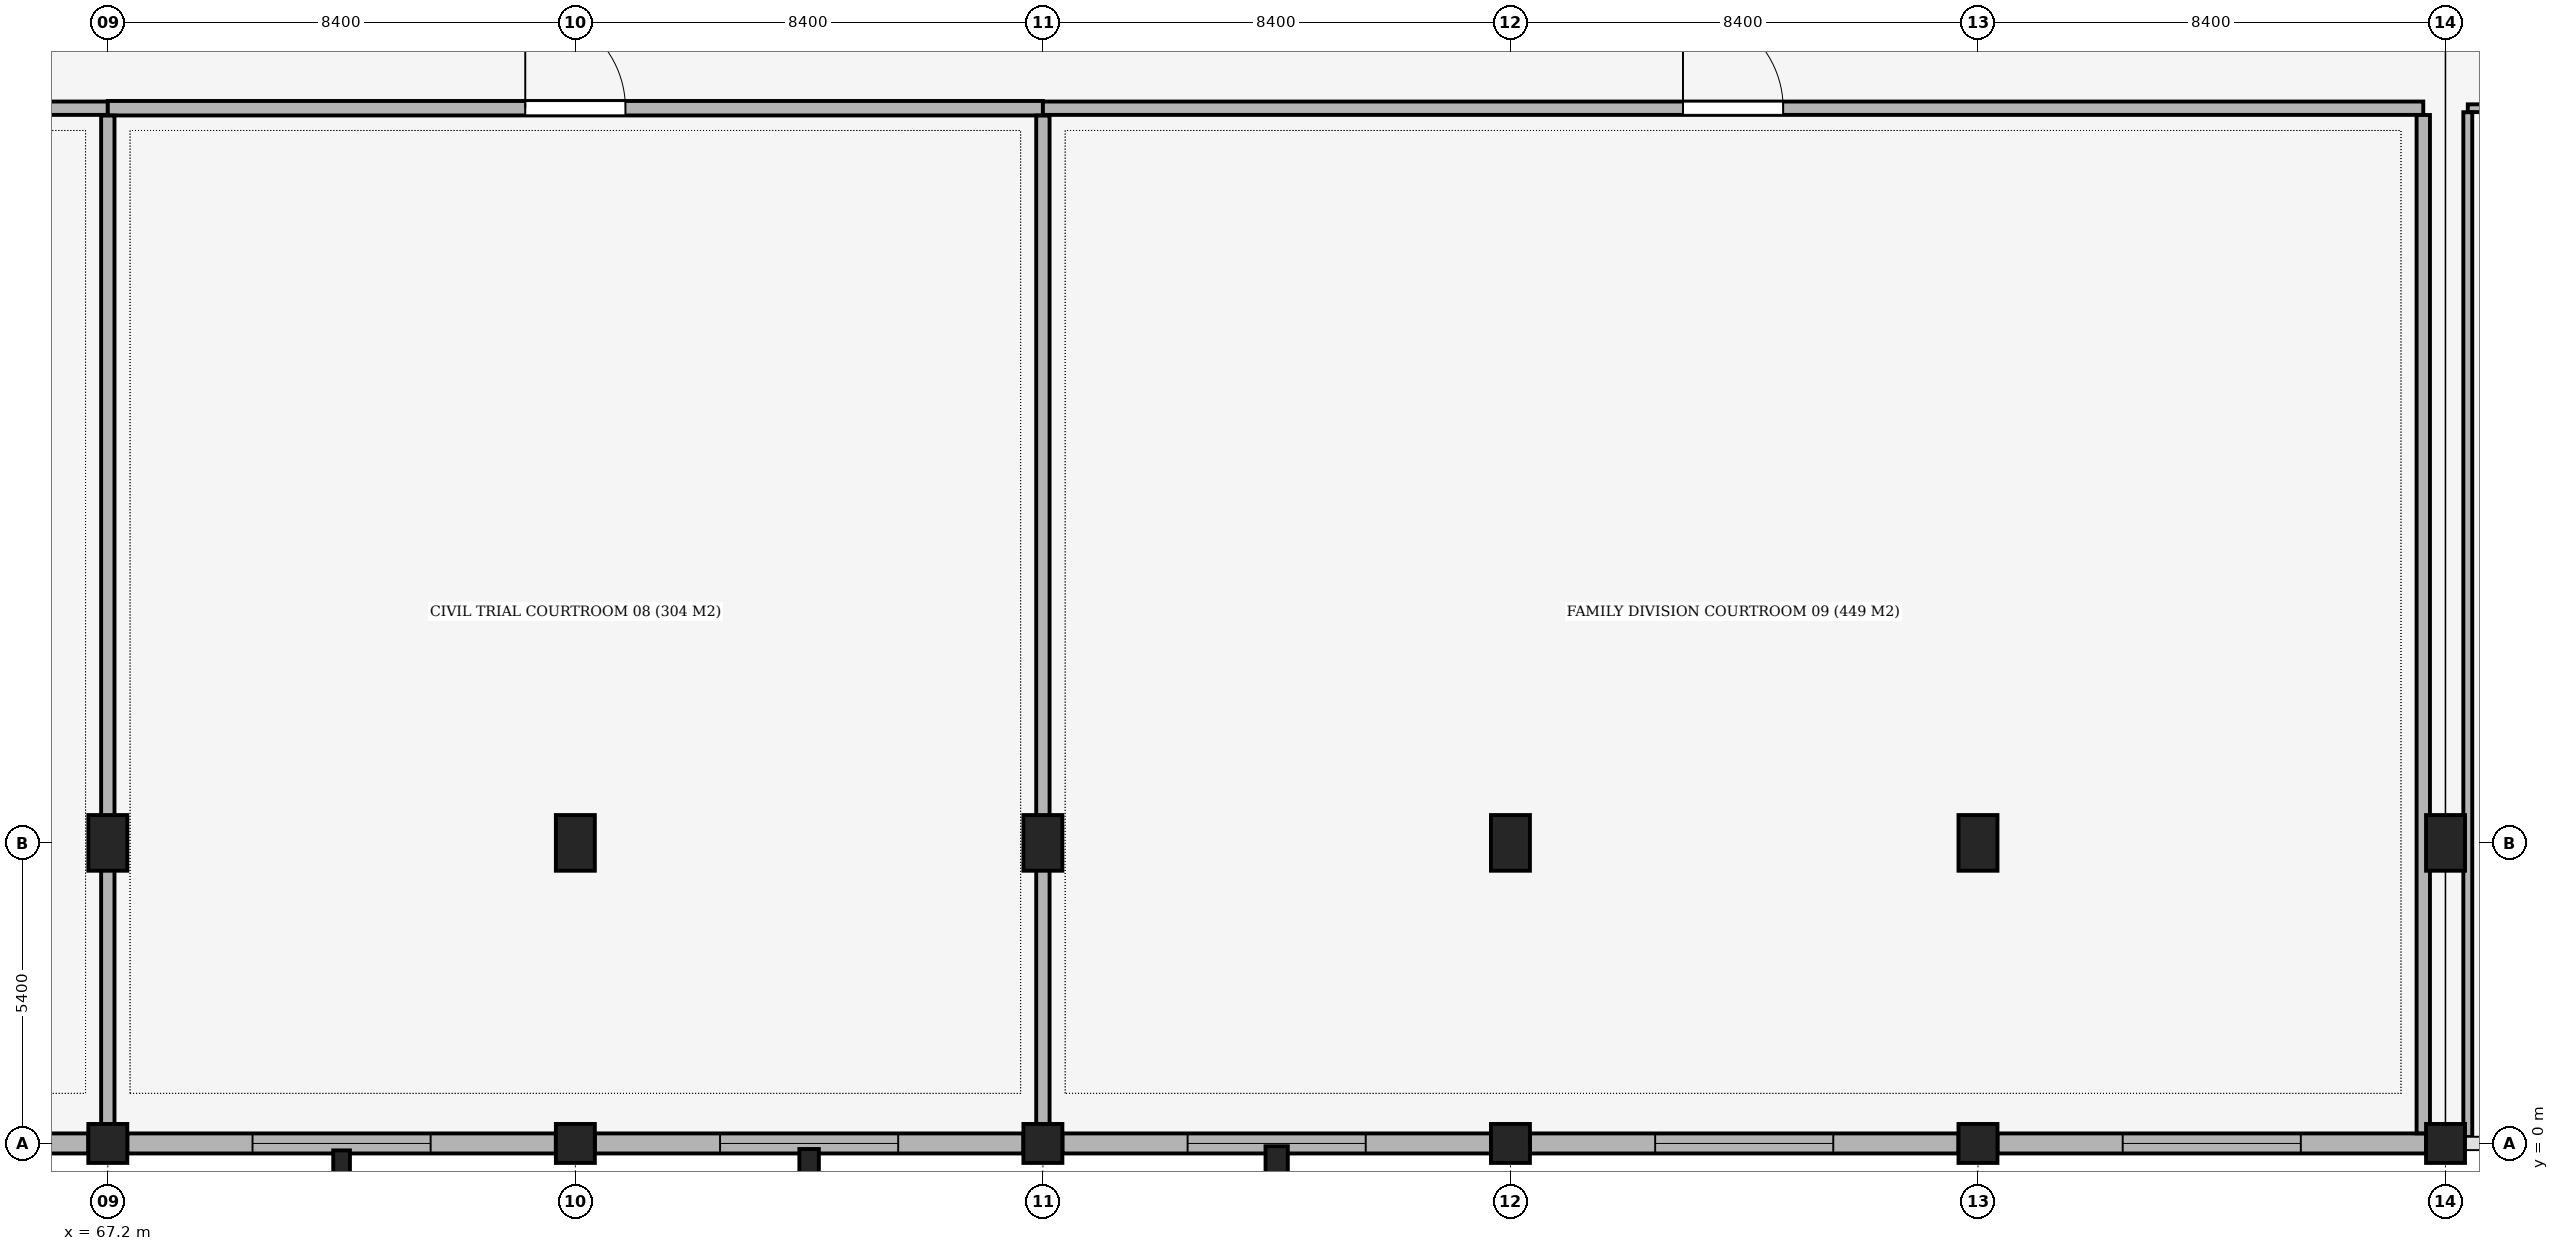
"""IFC4 building model, lengths in metres.
Left out: names, types, materials, properties, quantities, classifications, styles, units other than length and angle.
Written with IfcOpenShell. Run it as: python <this file> out.ifc"""

import sys

from ifc_helpers import new_model, si_unit, direction, frame, frame_2d, origin, origin_2d, place, context, subcontext, project, spatial, rectangle, extrude, element, fill, save


model = new_model("IFC4")
c1 = context("Model", 3, precision=1e-05, world=origin(), true_north=direction((0.0, 1.0)))
c2 = subcontext(c1, "Body", "Model", "MODEL_VIEW")
j1 = project(units=[si_unit("LENGTHUNIT", "METRE"), si_unit("PLANEANGLEUNIT", "RADIAN")], contexts=[c1])
p1 = place(None, origin())
s1 = spatial("IfcSite", under=j1, at=p1, CompositionType="ELEMENT")
p2 = place(p1, origin())
s2 = spatial("IfcBuilding", under=s1, at=p2, CompositionType="ELEMENT")
p3 = place(p2, frame((0.0, 0.0, 5.1)))
s3 = spatial("IfcBuildingStorey", under=s2, at=p3, CompositionType="ELEMENT", Elevation=5.1)
p4 = place(p3, frame((67.2, 0.0, 0.0), z_axis=(0.0, 0.0, 1.0), x_axis=(1.0, 0.0, 0.0)))
e1 = element("IfcColumn", 1, at=p4, inside=s3, PredefinedType="COLUMN", context=c2, shape_type="SweptSolid", body=[
    extrude(rectangle(XDim=0.7, YDim=0.7, at=origin_2d()), origin(), (0.0, 0.0, 1.0), 5.1),
])
p5 = place(p3, frame((67.2, 5.4, 0.0), z_axis=(0.0, 0.0, 1.0), x_axis=(1.0, 0.0, 0.0)))
e2 = element("IfcColumn", 2, at=p5, inside=s3, PredefinedType="COLUMN", context=c2, shape_type="SweptSolid", body=[
    extrude(rectangle(XDim=0.7, YDim=1.0, at=origin_2d()), origin(), (0.0, 0.0, 1.0), 5.1),
])
p6 = place(p3, frame((75.6, 0.0, 0.0), z_axis=(0.0, 0.0, 1.0), x_axis=(1.0, 0.0, 0.0)))
e3 = element("IfcColumn", 3, at=p6, inside=s3, PredefinedType="COLUMN", context=c2, shape_type="SweptSolid", body=[
    extrude(rectangle(XDim=0.7, YDim=0.7, at=origin_2d()), origin(), (0.0, 0.0, 1.0), 5.1),
])
p7 = place(p3, frame((75.6, 5.4, 0.0), z_axis=(0.0, 0.0, 1.0), x_axis=(1.0, 0.0, 0.0)))
e4 = element("IfcColumn", 4, at=p7, inside=s3, PredefinedType="COLUMN", context=c2, shape_type="SweptSolid", body=[
    extrude(rectangle(XDim=0.7, YDim=1.0, at=origin_2d()), origin(), (0.0, 0.0, 1.0), 5.1),
])
p8 = place(p3, frame((84.0, 0.0, 0.0), z_axis=(0.0, 0.0, 1.0), x_axis=(1.0, 0.0, 0.0)))
e5 = element("IfcColumn", 5, at=p8, inside=s3, PredefinedType="COLUMN", context=c2, shape_type="SweptSolid", body=[
    extrude(rectangle(XDim=0.7, YDim=0.7, at=origin_2d()), origin(), (0.0, 0.0, 1.0), 5.1),
])
p9 = place(p3, frame((84.0, 5.4, 0.0), z_axis=(0.0, 0.0, 1.0), x_axis=(1.0, 0.0, 0.0)))
e6 = element("IfcColumn", 6, at=p9, inside=s3, PredefinedType="COLUMN", context=c2, shape_type="SweptSolid", body=[
    extrude(rectangle(XDim=0.7, YDim=1.0, at=origin_2d()), origin(), (0.0, 0.0, 1.0), 5.1),
])
p10 = place(p3, frame((92.4, 0.0, 0.0), z_axis=(0.0, 0.0, 1.0), x_axis=(1.0, 0.0, 0.0)))
e7 = element("IfcColumn", 7, at=p10, inside=s3, PredefinedType="COLUMN", context=c2, shape_type="SweptSolid", body=[
    extrude(rectangle(XDim=0.7, YDim=0.7, at=origin_2d()), origin(), (0.0, 0.0, 1.0), 5.1),
])
p11 = place(p3, frame((92.4, 5.4, 0.0), z_axis=(0.0, 0.0, 1.0), x_axis=(1.0, 0.0, 0.0)))
e8 = element("IfcColumn", 8, at=p11, inside=s3, PredefinedType="COLUMN", context=c2, shape_type="SweptSolid", body=[
    extrude(rectangle(XDim=0.7, YDim=1.0, at=origin_2d()), origin(), (0.0, 0.0, 1.0), 5.1),
])
p12 = place(p3, frame((100.8, 0.0, 0.0), z_axis=(0.0, 0.0, 1.0), x_axis=(1.0, 0.0, 0.0)))
e9 = element("IfcColumn", 9, at=p12, inside=s3, PredefinedType="COLUMN", context=c2, shape_type="SweptSolid", body=[
    extrude(rectangle(XDim=0.7, YDim=0.7, at=origin_2d()), origin(), (0.0, 0.0, 1.0), 5.1),
])
p13 = place(p3, frame((100.8, 5.4, 0.0), z_axis=(0.0, 0.0, 1.0), x_axis=(1.0, 0.0, 0.0)))
e10 = element("IfcColumn", 10, at=p13, inside=s3, PredefinedType="COLUMN", context=c2, shape_type="SweptSolid", body=[
    extrude(rectangle(XDim=0.7, YDim=1.0, at=origin_2d()), origin(), (0.0, 0.0, 1.0), 5.1),
])
p14 = place(p3, frame((109.2, 0.0, 0.0), z_axis=(0.0, 0.0, 1.0), x_axis=(1.0, 0.0, 0.0)))
e11 = element("IfcColumn", 11, at=p14, inside=s3, PredefinedType="COLUMN", context=c2, shape_type="SweptSolid", body=[
    extrude(rectangle(XDim=0.7, YDim=0.7, at=origin_2d()), origin(), (0.0, 0.0, 1.0), 5.1),
])
p15 = place(p3, frame((109.2, 5.4, 0.0), z_axis=(0.0, 0.0, 1.0), x_axis=(1.0, 0.0, 0.0)))
e12 = element("IfcColumn", 12, at=p15, inside=s3, PredefinedType="COLUMN", context=c2, shape_type="SweptSolid", body=[
    extrude(rectangle(XDim=0.7, YDim=1.0, at=origin_2d()), origin(), (0.0, 0.0, 1.0), 5.1),
])
p16 = place(p3, frame((71.4, -0.35, 0.0), z_axis=(0.0, 0.0, 1.0), x_axis=(1.0, 0.0, 0.0)))
e13 = element("IfcColumn", 13, at=p16, inside=s3, PredefinedType="PILASTER", context=c2, shape_type="SweptSolid", body=[
    extrude(rectangle(XDim=0.3, YDim=0.45, at=origin_2d()), origin(), (0.0, 0.0, 1.0), 5.1),
])
p17 = place(p3, frame((79.8, -0.35, 0.0), z_axis=(0.0, 0.0, 1.0), x_axis=(1.0, 0.0, 0.0)))
e14 = element("IfcColumn", 14, at=p17, inside=s3, PredefinedType="PILASTER", context=c2, shape_type="SweptSolid", body=[
    extrude(rectangle(XDim=0.35, YDim=0.5, at=origin_2d()), origin(), (0.0, 0.0, 1.0), 5.1),
])
p18 = place(p3, frame((88.2, -0.35, 0.0), z_axis=(0.0, 0.0, 1.0), x_axis=(1.0, 0.0, 0.0)))
e15 = element("IfcColumn", 15, at=p18, inside=s3, PredefinedType="PILASTER", context=c2, shape_type="SweptSolid", body=[
    extrude(rectangle(XDim=0.4, YDim=0.6, at=origin_2d()), origin(), (0.0, 0.0, 1.0), 5.1),
])
p19 = place(p3, frame((108.85, 0.0, 0.0), z_axis=(0.0, 0.0, 1.0), x_axis=(-1.0, 0.0, 0.0)))
e16 = element("IfcWall", 16, at=p19, inside=s3, PredefinedType="SOLIDWALL", context=c2, shape_type="SweptSolid", body=[
    extrude(rectangle(XDim=7.7, YDim=0.36, at=frame_2d((3.85, 0.0))), origin(), (0.0, 0.0, 1.0), 4.07),
])
p20 = place(p19, frame((2.25, 0.0, 0.75)))
e17 = element("IfcOpeningElement", 17, at=p20, cuts=e16, PredefinedType="OPENING", context=c2, shape_type="SweptSolid", body=[
    extrude(rectangle(XDim=3.2, YDim=2.6, at=frame_2d((1.6, 1.3))), frame((0.0, 0.195, 0.0), z_axis=(0.0, -1.0, 0.0), x_axis=(1.0, 0.0, 0.0)), (0.0, 0.0, 1.0), 0.39),
])
p21 = place(p3, frame((100.45, 0.0, 0.0), z_axis=(0.0, 0.0, 1.0), x_axis=(-1.0, 0.0, 0.0)))
e18 = element("IfcWall", 18, at=p21, inside=s3, PredefinedType="SOLIDWALL", context=c2, shape_type="SweptSolid", body=[
    extrude(rectangle(XDim=7.7, YDim=0.36, at=frame_2d((3.85, 0.0))), origin(), (0.0, 0.0, 1.0), 4.07),
])
p22 = place(p21, frame((2.25, 0.0, 0.75)))
e19 = element("IfcOpeningElement", 19, at=p22, cuts=e18, PredefinedType="OPENING", context=c2, shape_type="SweptSolid", body=[
    extrude(rectangle(XDim=3.2, YDim=2.6, at=frame_2d((1.6, 1.3))), frame((0.0, 0.195, 0.0), z_axis=(0.0, -1.0, 0.0), x_axis=(1.0, 0.0, 0.0)), (0.0, 0.0, 1.0), 0.39),
])
p23 = place(p3, frame((92.05, 0.0, 0.0), z_axis=(0.0, 0.0, 1.0), x_axis=(-1.0, 0.0, 0.0)))
e20 = element("IfcWall", 20, at=p23, inside=s3, PredefinedType="SOLIDWALL", context=c2, shape_type="SweptSolid", body=[
    extrude(rectangle(XDim=7.7, YDim=0.36, at=frame_2d((3.85, 0.0))), origin(), (0.0, 0.0, 1.0), 4.07),
])
p24 = place(p23, frame((2.25, 0.0, 0.75)))
e21 = element("IfcOpeningElement", 21, at=p24, cuts=e20, PredefinedType="OPENING", context=c2, shape_type="SweptSolid", body=[
    extrude(rectangle(XDim=3.2, YDim=2.6, at=frame_2d((1.6, 1.3))), frame((0.0, 0.195, 0.0), z_axis=(0.0, -1.0, 0.0), x_axis=(1.0, 0.0, 0.0)), (0.0, 0.0, 1.0), 0.39),
])
p25 = place(p3, frame((83.65, 0.0, 0.0), z_axis=(0.0, 0.0, 1.0), x_axis=(-1.0, 0.0, 0.0)))
e22 = element("IfcWall", 22, at=p25, inside=s3, PredefinedType="SOLIDWALL", context=c2, shape_type="SweptSolid", body=[
    extrude(rectangle(XDim=7.7, YDim=0.36, at=frame_2d((3.85, 0.0))), origin(), (0.0, 0.0, 1.0), 4.07),
])
p26 = place(p25, frame((2.25, 0.0, 0.75)))
e23 = element("IfcOpeningElement", 23, at=p26, cuts=e22, PredefinedType="OPENING", context=c2, shape_type="SweptSolid", body=[
    extrude(rectangle(XDim=3.2, YDim=2.6, at=frame_2d((1.6, 1.3))), frame((0.0, 0.195, 0.0), z_axis=(0.0, -1.0, 0.0), x_axis=(1.0, 0.0, 0.0)), (0.0, 0.0, 1.0), 0.39),
])
p27 = place(p3, frame((75.25, 0.0, 0.0), z_axis=(0.0, 0.0, 1.0), x_axis=(-1.0, 0.0, 0.0)))
e24 = element("IfcWall", 24, at=p27, inside=s3, PredefinedType="SOLIDWALL", context=c2, shape_type="SweptSolid", body=[
    extrude(rectangle(XDim=7.7, YDim=0.36, at=frame_2d((3.85, 0.0))), origin(), (0.0, 0.0, 1.0), 4.07),
])
p28 = place(p27, frame((2.25, 0.0, 0.75)))
e25 = element("IfcOpeningElement", 25, at=p28, cuts=e24, PredefinedType="OPENING", context=c2, shape_type="SweptSolid", body=[
    extrude(rectangle(XDim=3.2, YDim=2.6, at=frame_2d((1.6, 1.3))), frame((0.0, 0.195, 0.0), z_axis=(0.0, -1.0, 0.0), x_axis=(1.0, 0.0, 0.0)), (0.0, 0.0, 1.0), 0.39),
])
p29 = place(p3, frame((66.85, 0.0, 0.0), z_axis=(0.0, 0.0, 1.0), x_axis=(-1.0, 0.0, 0.0)))
e26 = element("IfcWall", 26, at=p29, inside=s3, PredefinedType="SOLIDWALL", context=c2, shape_type="SweptSolid", body=[
    extrude(rectangle(XDim=7.7, YDim=0.36, at=frame_2d((3.85, 0.0))), origin(), (0.0, 0.0, 1.0), 4.07),
])
p30 = place(p29, frame((2.25, 0.0, 0.75)))
e27 = element("IfcOpeningElement", 27, at=p30, cuts=e26, PredefinedType="OPENING", context=c2, shape_type="SweptSolid", body=[
    extrude(rectangle(XDim=3.2, YDim=2.6, at=frame_2d((1.6, 1.3))), frame((0.0, 0.195, 0.0), z_axis=(0.0, -1.0, 0.0), x_axis=(1.0, 0.0, 0.0)), (0.0, 0.0, 1.0), 0.39),
])
p31 = place(p3, frame((50.4, 18.6, 0.0), z_axis=(0.0, 0.0, 1.0), x_axis=(1.0, 0.0, 0.0)))
e28 = element("IfcWall", 28, at=p31, inside=s3, PredefinedType="PARTITIONING", context=c2, shape_type="SweptSolid", body=[
    extrude(rectangle(XDim=16.8, YDim=0.24, at=frame_2d((8.4, 0.0))), origin(), (0.0, 0.0, 1.0), 3.67),
])
p32 = place(p31, frame((7.5, 0.0, 0.0)))
e29 = element("IfcOpeningElement", 29, at=p32, cuts=e28, PredefinedType="OPENING", context=c2, shape_type="SweptSolid", body=[
    extrude(rectangle(XDim=1.8, YDim=2.4, at=frame_2d((0.9, 1.2))), frame((0.0, 0.135, 0.0), z_axis=(0.0, -1.0, 0.0), x_axis=(1.0, 0.0, 0.0)), (0.0, 0.0, 1.0), 0.27),
])
p33 = place(p3, frame((67.2, 18.6, 0.0), z_axis=(0.0, 0.0, 1.0), x_axis=(1.0, 0.0, 0.0)))
e30 = element("IfcWall", 30, at=p33, inside=s3, PredefinedType="PARTITIONING", context=c2, shape_type="SweptSolid", body=[
    extrude(rectangle(XDim=16.8, YDim=0.26, at=frame_2d((8.4, 0.0))), origin(), (0.0, 0.0, 1.0), 3.67),
])
p34 = place(p33, frame((7.5, 0.0, 0.0)))
e31 = element("IfcOpeningElement", 31, at=p34, cuts=e30, PredefinedType="OPENING", context=c2, shape_type="SweptSolid", body=[
    extrude(rectangle(XDim=1.8, YDim=2.4, at=frame_2d((0.9, 1.2))), frame((0.0, 0.145, 0.0), z_axis=(0.0, -1.0, 0.0), x_axis=(1.0, 0.0, 0.0)), (0.0, 0.0, 1.0), 0.29),
])
p35 = place(p3, frame((84.0, 18.6, 0.0), z_axis=(0.0, 0.0, 1.0), x_axis=(1.0, 0.0, 0.0)))
e32 = element("IfcWall", 32, at=p35, inside=s3, PredefinedType="PARTITIONING", context=c2, shape_type="SweptSolid", body=[
    extrude(rectangle(XDim=24.8, YDim=0.24, at=frame_2d((12.4, 0.0))), origin(), (0.0, 0.0, 1.0), 3.67),
])
p36 = place(p35, frame((11.5, 0.0, 0.0)))
e33 = element("IfcOpeningElement", 33, at=p36, cuts=e32, PredefinedType="OPENING", context=c2, shape_type="SweptSolid", body=[
    extrude(rectangle(XDim=1.8, YDim=2.4, at=frame_2d((0.9, 1.2))), frame((0.0, 0.135, 0.0), z_axis=(0.0, -1.0, 0.0), x_axis=(1.0, 0.0, 0.0)), (0.0, 0.0, 1.0), 0.27),
])
p37 = place(p3, frame((109.6, 18.6, 0.0), z_axis=(0.0, 0.0, 1.0), x_axis=(1.0, 0.0, 0.0)))
e34 = element("IfcWall", 34, at=p37, inside=s3, PredefinedType="PARTITIONING", context=c2, shape_type="SweptSolid", body=[
    extrude(rectangle(XDim=20.6, YDim=0.14, at=frame_2d((10.3, 0.0))), origin(), (0.0, 0.0, 1.0), 3.67),
])
p38 = place(p37, frame((9.675, 0.0, 0.0)))
e35 = element("IfcOpeningElement", 35, at=p38, cuts=e34, PredefinedType="OPENING", context=c2, shape_type="SweptSolid", body=[
    extrude(rectangle(XDim=1.25, YDim=2.2, at=frame_2d((0.625, 1.1))), frame((0.0, 0.085, 0.0), z_axis=(0.0, -1.0, 0.0), x_axis=(1.0, 0.0, 0.0)), (0.0, 0.0, 1.0), 0.17),
])
for number, where, z_axis, x_axis in (
    (36, (67.2, 0.065, 0.0), (0.0, 0.0, 1.0), (0.0, 1.0, 0.0)),
    (37, (84.0, 0.065, 0.0), (0.0, 0.0, 1.0), (0.0, 1.0, 0.0)),
):
    element("IfcWall", number, at=place(p3, frame(where, z_axis=z_axis, x_axis=x_axis)), inside=s3, PredefinedType="PARTITIONING", context=c2, shape_type="SweptSolid", body=[
        extrude(rectangle(XDim=18.403, YDim=0.24, at=frame_2d((9.202, 0.0))), origin(), (0.0, 0.0, 1.0), 3.67),
    ])
p39 = place(p3, frame((108.8, 0.182, 0.0), z_axis=(0.0, 0.0, 1.0), x_axis=(0.0, 1.0, 0.0)))
e38 = element("IfcWall", 38, at=p39, inside=s3, PredefinedType="PARTITIONING", context=c2, shape_type="SweptSolid", body=[
    extrude(rectangle(XDim=18.296, YDim=0.24, at=frame_2d((9.148, 0.0))), origin(), (0.0, 0.0, 1.0), 3.67),
])
p40 = place(p3, frame((109.6, 0.115, 0.0), z_axis=(0.0, 0.0, 1.0), x_axis=(0.0, 1.0, 0.0)))
e39 = element("IfcWall", 39, at=p40, inside=s3, PredefinedType="PARTITIONING", context=c2, shape_type="SweptSolid", body=[
    extrude(rectangle(XDim=18.413, YDim=0.16, at=frame_2d((9.207, 0.0))), origin(), (0.0, 0.0, 1.0), 3.67),
])
p41 = place(p20, origin())
e40 = element("IfcWindow", 40, at=p41, inside=s3, PartitioningType="SINGLE_PANEL", PredefinedType="WINDOW", context=c2, shape_type="SweptSolid", body=[
    extrude(rectangle(XDim=3.2, YDim=2.6, at=frame_2d((1.6, 1.3))), frame((0.0, 0.03, 0.0), z_axis=(0.0, -1.0, 0.0), x_axis=(1.0, 0.0, 0.0)), (0.0, 0.0, 1.0), 0.06),
])
fill(e17, e40)
p42 = place(p22, origin())
e41 = element("IfcWindow", 41, at=p42, inside=s3, PartitioningType="SINGLE_PANEL", PredefinedType="WINDOW", context=c2, shape_type="SweptSolid", body=[
    extrude(rectangle(XDim=3.2, YDim=2.6, at=frame_2d((1.6, 1.3))), frame((0.0, 0.03, 0.0), z_axis=(0.0, -1.0, 0.0), x_axis=(1.0, 0.0, 0.0)), (0.0, 0.0, 1.0), 0.06),
])
fill(e19, e41)
p43 = place(p24, origin())
e42 = element("IfcWindow", 42, at=p43, inside=s3, PartitioningType="SINGLE_PANEL", PredefinedType="WINDOW", context=c2, shape_type="SweptSolid", body=[
    extrude(rectangle(XDim=3.2, YDim=2.6, at=frame_2d((1.6, 1.3))), frame((0.0, 0.03, 0.0), z_axis=(0.0, -1.0, 0.0), x_axis=(1.0, 0.0, 0.0)), (0.0, 0.0, 1.0), 0.06),
])
fill(e21, e42)
p44 = place(p26, origin())
e43 = element("IfcWindow", 43, at=p44, inside=s3, PartitioningType="SINGLE_PANEL", PredefinedType="WINDOW", context=c2, shape_type="SweptSolid", body=[
    extrude(rectangle(XDim=3.2, YDim=2.6, at=frame_2d((1.6, 1.3))), frame((0.0, 0.03, 0.0), z_axis=(0.0, -1.0, 0.0), x_axis=(1.0, 0.0, 0.0)), (0.0, 0.0, 1.0), 0.06),
])
fill(e23, e43)
p45 = place(p28, origin())
e44 = element("IfcWindow", 44, at=p45, inside=s3, PartitioningType="SINGLE_PANEL", PredefinedType="WINDOW", context=c2, shape_type="SweptSolid", body=[
    extrude(rectangle(XDim=3.2, YDim=2.6, at=frame_2d((1.6, 1.3))), frame((0.0, 0.03, 0.0), z_axis=(0.0, -1.0, 0.0), x_axis=(1.0, 0.0, 0.0)), (0.0, 0.0, 1.0), 0.06),
])
fill(e25, e44)
p46 = place(p34, origin())
e45 = element("IfcDoor", 45, at=p46, inside=s3, OperationType="SINGLE_SWING_LEFT", PredefinedType="DOOR", context=c2, shape_type="SweptSolid", body=[
    extrude(rectangle(XDim=1.8, YDim=2.4, at=frame_2d((0.9, 1.2))), frame((0.0, 0.025, 0.0), z_axis=(0.0, -1.0, 0.0), x_axis=(1.0, 0.0, 0.0)), (0.0, 0.0, 1.0), 0.05),
])
fill(e31, e45)
p47 = place(p36, origin())
e46 = element("IfcDoor", 46, at=p47, inside=s3, OperationType="SINGLE_SWING_LEFT", PredefinedType="DOOR", context=c2, shape_type="SweptSolid", body=[
    extrude(rectangle(XDim=1.8, YDim=2.4, at=frame_2d((0.9, 1.2))), frame((0.0, 0.025, 0.0), z_axis=(0.0, -1.0, 0.0), x_axis=(1.0, 0.0, 0.0)), (0.0, 0.0, 1.0), 0.05),
])
fill(e33, e46)
save(model, sys.argv[1])
